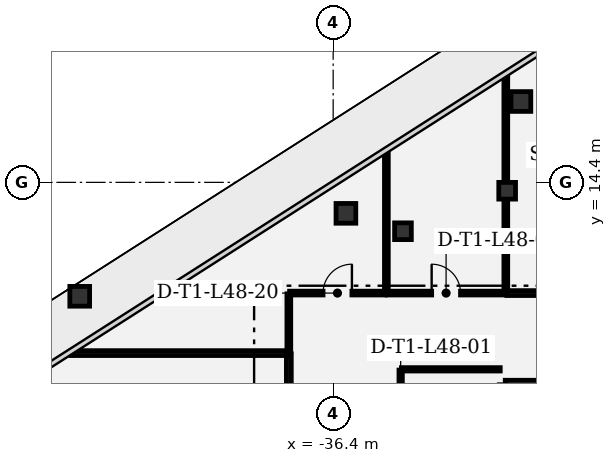
"""IFC4 building model, lengths in metres.
Left out: names, types, materials, properties, quantities, classifications, styles, units other than length and angle.
Written with IfcOpenShell. Run it as: python <this file> out.ifc"""

import sys

from ifc_helpers import new_model, si_unit, direction, frame, frame_2d, origin, origin_2d, place, context, subcontext, project, spatial, rectangle, extrude, element, fill, save


model = new_model("IFC4")
c1 = context("Model", 3, precision=1e-05, world=origin(), true_north=direction((0.0, 1.0)))
c2 = subcontext(c1, "Body", "Model", "MODEL_VIEW")
j1 = project(units=[si_unit("LENGTHUNIT", "METRE"), si_unit("PLANEANGLEUNIT", "RADIAN")], contexts=[c1])
p1 = place(None, origin())
s1 = spatial("IfcSite", under=j1, at=p1, CompositionType="ELEMENT")
p2 = place(p1, origin())
s2 = spatial("IfcBuilding", under=s1, at=p2, CompositionType="ELEMENT")
p3 = place(p2, frame((0.0, 0.0, 209.1)))
s3 = spatial("IfcBuildingStorey", under=s2, at=p3, CompositionType="ELEMENT", Elevation=209.1)
for number, where, z_axis, x_axis in (
    (1, (-44.736, 10.652, 0.0), (0.0, 0.0, 1.0), (1.0, 0.0, 0.0)),
    (2, (-35.981, 13.381, 0.0), (0.0, 0.0, 1.0), (1.0, 0.0, 0.0)),
    (3, (-30.225, 17.06, 0.0), (0.0, 0.0, 1.0), (1.0, 0.0, 0.0)),
):
    element("IfcColumn", number, at=place(p3, frame(where, z_axis=z_axis, x_axis=x_axis)), inside=s3, PredefinedType="COLUMN", context=c2, shape_type="SweptSolid", body=[
        extrude(rectangle(XDim=0.65, YDim=0.65, at=origin_2d()), origin(), (0.0, 0.0, 1.0), 4.05),
    ])
for number, where, z_axis, x_axis in (
    (4, (-34.104, 12.792, 0.0), (0.0, 0.0, 1.0), (1.0, 0.0, 0.0)),
    (5, (-30.677, 14.124, 0.0), (0.0, 0.0, 1.0), (1.0, 0.0, 0.0)),
):
    element("IfcColumn", number, at=place(p3, frame(where, z_axis=z_axis, x_axis=x_axis)), inside=s3, PredefinedType="COLUMN", context=c2, shape_type="SweptSolid", body=[
        extrude(rectangle(XDim=0.55, YDim=0.55, at=origin_2d()), origin(), (0.0, 0.0, 1.0), 4.05),
    ])
p4 = place(p3, frame((-30.74, 7.77, 0.0), z_axis=(0.0, 0.0, 1.0), x_axis=(1.0, 0.0, 0.0)))
e6 = element("IfcWall", 6, at=p4, inside=s3, PredefinedType="SHEAR", context=c2, shape_type="SweptSolid", body=[
    extrude(rectangle(XDim=2.48, YDim=0.24, at=frame_2d((1.24, 0.0))), origin(), (0.0, 0.0, 1.0), 3.78),
])
p5 = place(p3, frame((-30.905, 8.25, 0.0), z_axis=(0.0, 0.0, 1.0), x_axis=(-1.0, 0.0, 0.0)))
e7 = element("IfcWall", 7, at=p5, inside=s3, PredefinedType="PARTITIONING", context=c2, shape_type="SweptSolid", body=[
    extrude(rectangle(XDim=3.25, YDim=0.11, at=frame_2d((1.625, 0.0))), origin(), (0.0, 0.0, 1.0), 3.78),
])
p6 = place(p3, frame((-34.18, 8.225, 0.0), z_axis=(0.0, 0.0, 1.0), x_axis=(0.0, -1.0, 0.0)))
e8 = element("IfcWall", 8, at=p6, inside=s3, PredefinedType="PARTITIONING", context=c2, shape_type="SweptSolid", body=[
    extrude(rectangle(XDim=3.385, YDim=0.11, at=frame_2d((1.692, 0.0))), origin(), (0.0, 0.0, 1.0), 3.78),
])
p7 = place(p6, frame((1.252, 0.0, 0.0)))
e9 = element("IfcOpeningElement", 9, at=p7, cuts=e8, PredefinedType="OPENING", context=c2, shape_type="SweptSolid", body=[
    extrude(rectangle(XDim=0.88, YDim=2.1, at=frame_2d((0.44, 1.05))), frame((0.0, 0.065, 0.0), z_axis=(0.0, -1.0, 0.0), x_axis=(1.0, 0.0, 0.0)), (0.0, 0.0, 1.0), 0.13),
])
p8 = place(p3, frame((-34.625, 10.758, 0.0), z_axis=(0.0, 0.0, 1.0), x_axis=(1.0, 0.0, 0.0)))
e10 = element("IfcWall", 10, at=p8, inside=s3, PredefinedType="PARTITIONING", context=c2, shape_type="SweptSolid", body=[
    extrude(rectangle(XDim=3.879, YDim=0.125, at=frame_2d((1.939, 0.0))), origin(), (0.0, 0.0, 1.0), 2.9),
])
p9 = place(p8, frame((1.464, 0.0, 0.0)))
e11 = element("IfcOpeningElement", 11, at=p9, cuts=e10, PredefinedType="OPENING", context=c2, shape_type="SweptSolid", body=[
    extrude(rectangle(XDim=0.95, YDim=2.15, at=frame_2d((0.475, 1.075))), frame((0.0, 0.073, 0.0), z_axis=(0.0, -1.0, 0.0), x_axis=(1.0, 0.0, 0.0)), (0.0, 0.0, 1.0), 0.145),
])
p10 = place(p3, frame((-30.721, 10.783, 0.0), z_axis=(0.0, 0.0, 1.0), x_axis=(0.0, 1.0, 0.0)))
e12 = element("IfcWall", 12, at=p10, inside=s3, PredefinedType="PARTITIONING", context=c2, shape_type="SweptSolid", body=[
    extrude(rectangle(XDim=3.001, YDim=0.125, at=frame_2d((1.5, 0.0))), origin(), (0.0, 0.0, 1.0), 3.78),
])
p11 = place(p3, frame((-30.721, 14.464, 0.0), z_axis=(0.0, 0.0, 1.0), x_axis=(0.0, 1.0, 0.0)))
e13 = element("IfcWall", 13, at=p11, inside=s3, PredefinedType="PARTITIONING", context=c2, shape_type="SweptSolid", body=[
    extrude(rectangle(XDim=3.434, YDim=0.125, at=frame_2d((1.717, 0.0))), origin(), (0.0, 0.0, 1.0), 3.78),
])
p12 = place(p3, frame((-34.65, 15.388, 0.0), z_axis=(0.0, 0.0, 1.0), x_axis=(0.0, -1.0, 0.0)))
e14 = element("IfcWall", 14, at=p12, inside=s3, PredefinedType="PARTITIONING", context=c2, shape_type="SweptSolid", body=[
    extrude(rectangle(XDim=4.604, YDim=0.125, at=frame_2d((2.302, 0.0))), origin(), (0.0, 0.0, 1.0), 3.78),
])
p13 = place(p3, frame((-30.688, 10.758, 0.0), z_axis=(0.0, 0.0, 1.0), x_axis=(1.0, 0.0, 0.0)))
e15 = element("IfcWall", 15, at=p13, inside=s3, PredefinedType="PARTITIONING", context=c2, shape_type="SweptSolid", body=[
    extrude(rectangle(XDim=3.481, YDim=0.16, at=frame_2d((1.741, 0.0))), origin(), (0.0, 0.0, 1.0), 3.78),
])
p14 = place(p13, frame((1.191, 0.0, 0.0)))
e16 = element("IfcOpeningElement", 16, at=p14, cuts=e15, PredefinedType="OPENING", context=c2, shape_type="SweptSolid", body=[
    extrude(rectangle(XDim=1.1, YDim=2.15, at=frame_2d((0.55, 1.075))), frame((0.0, 0.09, 0.0), z_axis=(0.0, -1.0, 0.0), x_axis=(1.0, 0.0, 0.0)), (0.0, 0.0, 1.0), 0.18),
])
p15 = place(p3, frame((-37.858, 4.783, 0.0), z_axis=(0.0, 0.0, 1.0), x_axis=(0.0, 1.0, 0.0)))
e17 = element("IfcWall", 17, at=p15, inside=s3, PredefinedType="PARTITIONING", context=c2, shape_type="SweptSolid", body=[
    extrude(rectangle(XDim=3.976, YDim=0.16, at=frame_2d((1.988, 0.0))), origin(), (0.0, 0.0, 1.0), 3.78),
])
p16 = place(p15, frame((1.438, 0.0, 0.0)))
e18 = element("IfcOpeningElement", 18, at=p16, cuts=e17, PredefinedType="OPENING", context=c2, shape_type="SweptSolid", body=[
    extrude(rectangle(XDim=1.1, YDim=2.15, at=frame_2d((0.55, 1.075))), frame((0.0, 0.09, 0.0), z_axis=(0.0, -1.0, 0.0), x_axis=(1.0, 0.0, 0.0)), (0.0, 0.0, 1.0), 0.18),
])
p17 = place(p3, frame((-37.883, 8.784, 0.0), z_axis=(0.0, 0.0, 1.0), x_axis=(-1.0, 0.0, 0.0)))
e19 = element("IfcWall", 19, at=p17, inside=s3, PredefinedType="PARTITIONING", context=c2, shape_type="SweptSolid", body=[
    extrude(rectangle(XDim=7.145, YDim=0.16, at=frame_2d((3.572, 0.0))), origin(), (0.0, 0.0, 1.0), 2.9),
])
p18 = place(p3, frame((-37.858, 8.817, 0.0), z_axis=(0.0, 0.0, 1.0), x_axis=(0.0, 1.0, 0.0)))
e20 = element("IfcWall", 20, at=p18, inside=s3, PredefinedType="PARTITIONING", context=c2, shape_type="SweptSolid", body=[
    extrude(rectangle(XDim=1.917, YDim=0.125, at=frame_2d((0.958, 0.0))), origin(), (0.0, 0.0, 1.0), 3.78),
])
p19 = place(p3, frame((-37.833, 10.758, 0.0), z_axis=(0.0, 0.0, 1.0), x_axis=(1.0, 0.0, 0.0)))
e21 = element("IfcWall", 21, at=p19, inside=s3, PredefinedType="PARTITIONING", context=c2, shape_type="SweptSolid", body=[
    extrude(rectangle(XDim=3.15, YDim=0.125, at=frame_2d((1.575, 0.0))), origin(), (0.0, 0.0, 1.0), 2.9),
])
p20 = place(p19, frame((1.1, 0.0, 0.0)))
e22 = element("IfcOpeningElement", 22, at=p20, cuts=e21, PredefinedType="OPENING", context=c2, shape_type="SweptSolid", body=[
    extrude(rectangle(XDim=0.95, YDim=2.15, at=frame_2d((0.475, 1.075))), frame((0.0, 0.073, 0.0), z_axis=(0.0, -1.0, 0.0), x_axis=(1.0, 0.0, 0.0)), (0.0, 0.0, 1.0), 0.145),
])
p21 = place(p9, origin())
e23 = element("IfcDoor", 23, at=p21, inside=s3, OperationType="SINGLE_SWING_LEFT", PredefinedType="DOOR", context=c2, shape_type="SweptSolid", body=[
    extrude(rectangle(XDim=0.95, YDim=2.15, at=frame_2d((0.475, 1.075))), frame((0.0, 0.025, 0.0), z_axis=(0.0, -1.0, 0.0), x_axis=(1.0, 0.0, 0.0)), (0.0, 0.0, 1.0), 0.05),
])
fill(e11, e23)
p22 = place(p20, origin())
e24 = element("IfcDoor", 24, at=p22, inside=s3, OperationType="SINGLE_SWING_RIGHT", PredefinedType="DOOR", context=c2, shape_type="SweptSolid", body=[
    extrude(rectangle(XDim=0.95, YDim=2.15, at=frame_2d((0.475, 1.075))), frame((0.0, 0.025, 0.0), z_axis=(0.0, -1.0, 0.0), x_axis=(1.0, 0.0, 0.0)), (0.0, 0.0, 1.0), 0.05),
])
fill(e22, e24)
save(model, sys.argv[1])
